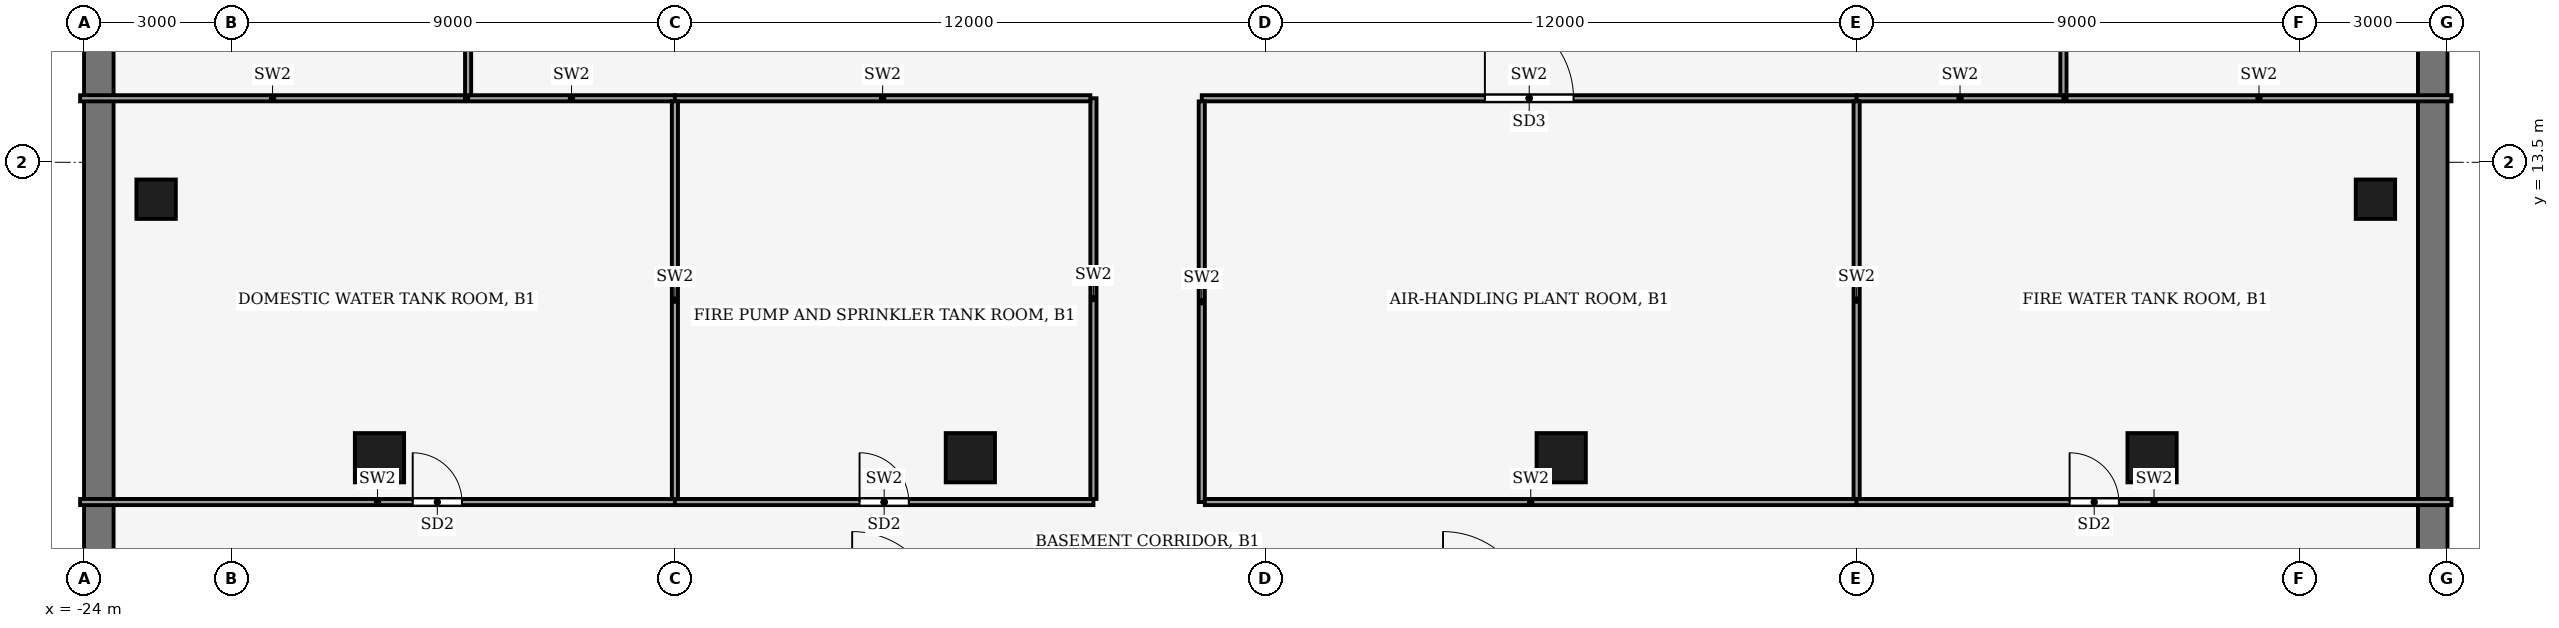
"""IFC4 building model, lengths in metres.
Left out: names, types, materials, properties, quantities, classifications, styles, units other than length and angle.
Written with IfcOpenShell. Run it as: python <this file> out.ifc"""

import sys

from ifc_helpers import new_model, si_unit, direction, frame, frame_2d, origin, origin_2d, place, context, subcontext, project, spatial, rectangle, hollow_rectangle, extrude, element, fill, save


model = new_model("IFC4")
c1 = context("Model", 3, precision=1e-05, world=origin(), true_north=direction((0.0, 1.0)))
c2 = subcontext(c1, "Body", "Model", "MODEL_VIEW")
j1 = project(units=[si_unit("LENGTHUNIT", "METRE"), si_unit("PLANEANGLEUNIT", "RADIAN")], contexts=[c1])
p1 = place(None, origin())
s1 = spatial("IfcSite", under=j1, at=p1, CompositionType="ELEMENT")
p2 = place(p1, origin())
s2 = spatial("IfcBuilding", under=s1, at=p2, CompositionType="ELEMENT")
p3 = place(p2, frame((0.0, 0.0, -6.0)))
s3 = spatial("IfcBuildingStorey", under=s2, at=p3, CompositionType="ELEMENT", Elevation=-6.0)
for number, where, z_axis, x_axis in (
    (1, (-23.7, 0.03, 0.0), (0.0, 0.0, 1.0), (0.0, 1.0, 0.0)),
    (2, (23.7, 38.97, 0.0), (0.0, 0.0, 1.0), (0.0, -1.0, 0.0)),
):
    element("IfcWall", number, at=place(p3, frame(where, z_axis=z_axis, x_axis=x_axis)), inside=s3, PredefinedType="SHEAR", context=c2, shape_type="SweptSolid", body=[
        extrude(rectangle(XDim=38.941, YDim=0.6, at=frame_2d((19.47, 0.0))), origin(), (0.0, 0.0, 1.0), 5.55),
    ])
for number, where, z_axis, x_axis in (
    (3, (22.536, 12.75, 0.0), (0.0, 0.0, 1.0), (1.0, 0.0, 0.0)),
    (4, (-22.536, 12.75, 0.0), (0.0, 0.0, 1.0), (1.0, 0.0, 0.0)),
):
    element("IfcColumn", number, at=place(p3, frame(where, z_axis=z_axis, x_axis=x_axis)), inside=s3, PredefinedType="COLUMN", context=c2, shape_type="SweptSolid", body=[
        extrude(hollow_rectangle(XDim=0.8, YDim=0.8, WallThickness=0.04, at=origin_2d()), origin(), (0.0, 0.0, 1.0), 6.0),
    ])
for number, where, z_axis, x_axis in (
    (5, (-18.0, 7.5, 0.0), (0.0, 0.0, 1.0), (1.0, 0.0, 0.0)),
    (6, (-6.0, 7.5, 0.0), (0.0, 0.0, 1.0), (1.0, 0.0, 0.0)),
    (7, (6.0, 7.5, 0.0), (0.0, 0.0, 1.0), (1.0, 0.0, 0.0)),
    (8, (18.0, 7.5, 0.0), (0.0, 0.0, 1.0), (1.0, 0.0, 0.0)),
):
    element("IfcColumn", number, at=place(p3, frame(where, z_axis=z_axis, x_axis=x_axis)), inside=s3, PredefinedType="COLUMN", context=c2, shape_type="SweptSolid", body=[
        extrude(rectangle(XDim=1.0, YDim=1.0, at=origin_2d()), origin(), (0.0, 0.0, 1.0), 6.0),
    ])
p4 = place(p3, frame((-24.08, 6.6, 0.0), z_axis=(0.0, 0.0, 1.0), x_axis=(1.0, 0.0, 0.0)))
e9 = element("IfcWall", 9, at=p4, inside=s3, PredefinedType="PARTITIONING", context=c2, shape_type="SweptSolid", body=[
    extrude(rectangle(XDim=12.08, YDim=0.125, at=frame_2d((6.04, 0.0))), origin(), (0.0, 0.0, 1.0), 5.55),
])
p5 = place(p4, frame((6.755, 0.0, 0.0)))
e10 = element("IfcOpeningElement", 10, at=p5, cuts=e9, PredefinedType="OPENING", context=c2, shape_type="SweptSolid", body=[
    extrude(rectangle(XDim=1.0, YDim=2.1, at=frame_2d((0.5, 1.05))), frame((0.0, 0.073, 0.0), z_axis=(0.0, -1.0, 0.0), x_axis=(1.0, 0.0, 0.0)), (0.0, 0.0, 1.0), 0.145),
])
p6 = place(p3, frame((-12.0, 14.8, 0.0), z_axis=(0.0, 0.0, 1.0), x_axis=(-1.0, 0.0, 0.0)))
e11 = element("IfcWall", 11, at=p6, inside=s3, PredefinedType="PARTITIONING", context=c2, shape_type="SweptSolid", body=[
    extrude(rectangle(XDim=4.2, YDim=0.125, at=frame_2d((2.1, 0.0))), origin(), (0.0, 0.0, 1.0), 5.55),
])
p7 = place(p3, frame((-12.0, 6.6, 0.0), z_axis=(0.0, 0.0, 1.0), x_axis=(1.0, 0.0, 0.0)))
e12 = element("IfcWall", 12, at=p7, inside=s3, PredefinedType="PARTITIONING", context=c2, shape_type="SweptSolid", body=[
    extrude(rectangle(XDim=8.5, YDim=0.125, at=frame_2d((4.25, 0.0))), origin(), (0.0, 0.0, 1.0), 5.55),
])
p8 = place(p7, frame((3.75, 0.0, 0.0)))
e13 = element("IfcOpeningElement", 13, at=p8, cuts=e12, PredefinedType="OPENING", context=c2, shape_type="SweptSolid", body=[
    extrude(rectangle(XDim=1.0, YDim=2.1, at=frame_2d((0.5, 1.05))), frame((0.0, 0.073, 0.0), z_axis=(0.0, -1.0, 0.0), x_axis=(1.0, 0.0, 0.0)), (0.0, 0.0, 1.0), 0.145),
])
p9 = place(p3, frame((-3.5, 6.663, 0.0), z_axis=(0.0, 0.0, 1.0), x_axis=(0.0, 1.0, 0.0)))
e14 = element("IfcWall", 14, at=p9, inside=s3, PredefinedType="PARTITIONING", context=c2, shape_type="SweptSolid", body=[
    extrude(rectangle(XDim=8.137, YDim=0.125, at=frame_2d((4.069, 0.0))), origin(), (0.0, 0.0, 1.0), 5.55),
])
p10 = place(p3, frame((-3.562, 14.8, 0.0), z_axis=(0.0, 0.0, 1.0), x_axis=(-1.0, 0.0, 0.0)))
e15 = element("IfcWall", 15, at=p10, inside=s3, PredefinedType="PARTITIONING", context=c2, shape_type="SweptSolid", body=[
    extrude(rectangle(XDim=8.438, YDim=0.125, at=frame_2d((4.219, 0.0))), origin(), (0.0, 0.0, 1.0), 5.55),
])
p11 = place(p3, frame((-1.3, 14.8, 0.0), z_axis=(0.0, 0.0, 1.0), x_axis=(1.0, 0.0, 0.0)))
e16 = element("IfcWall", 16, at=p11, inside=s3, PredefinedType="PARTITIONING", context=c2, shape_type="SweptSolid", body=[
    extrude(rectangle(XDim=13.3, YDim=0.125, at=frame_2d((6.65, 0.0))), origin(), (0.0, 0.0, 1.0), 5.55),
])
p12 = place(p11, frame((5.75, 0.0, 0.0)))
e17 = element("IfcOpeningElement", 17, at=p12, cuts=e16, PredefinedType="OPENING", context=c2, shape_type="SweptSolid", body=[
    extrude(rectangle(XDim=1.8, YDim=2.4, at=frame_2d((0.9, 1.2))), frame((0.0, 0.073, 0.0), z_axis=(0.0, -1.0, 0.0), x_axis=(1.0, 0.0, 0.0)), (0.0, 0.0, 1.0), 0.145),
])
p13 = place(p3, frame((-1.3, 14.738, 0.0), z_axis=(0.0, 0.0, 1.0), x_axis=(0.0, -1.0, 0.0)))
e18 = element("IfcWall", 18, at=p13, inside=s3, PredefinedType="PARTITIONING", context=c2, shape_type="SweptSolid", body=[
    extrude(rectangle(XDim=8.137, YDim=0.125, at=frame_2d((4.069, 0.0))), origin(), (0.0, 0.0, 1.0), 5.55),
])
p14 = place(p3, frame((-1.238, 6.6, 0.0), z_axis=(0.0, 0.0, 1.0), x_axis=(1.0, 0.0, 0.0)))
e19 = element("IfcWall", 19, at=p14, inside=s3, PredefinedType="PARTITIONING", context=c2, shape_type="SweptSolid", body=[
    extrude(rectangle(XDim=13.238, YDim=0.125, at=frame_2d((6.619, 0.0))), origin(), (0.0, 0.0, 1.0), 5.55),
])
p15 = place(p3, frame((12.0, 6.6, 0.0), z_axis=(0.0, 0.0, 1.0), x_axis=(1.0, 0.0, 0.0)))
e20 = element("IfcWall", 20, at=p15, inside=s3, PredefinedType="PARTITIONING", context=c2, shape_type="SweptSolid", body=[
    extrude(rectangle(XDim=12.08, YDim=0.125, at=frame_2d((6.04, 0.0))), origin(), (0.0, 0.0, 1.0), 5.55),
])
p16 = place(p15, frame((4.325, 0.0, 0.0)))
e21 = element("IfcOpeningElement", 21, at=p16, cuts=e20, PredefinedType="OPENING", context=c2, shape_type="SweptSolid", body=[
    extrude(rectangle(XDim=1.0, YDim=2.1, at=frame_2d((0.5, 1.05))), frame((0.0, 0.073, 0.0), z_axis=(0.0, -1.0, 0.0), x_axis=(1.0, 0.0, 0.0)), (0.0, 0.0, 1.0), 0.145),
])
p17 = place(p3, frame((16.2, 14.8, 0.0), z_axis=(0.0, 0.0, 1.0), x_axis=(-1.0, 0.0, 0.0)))
e22 = element("IfcWall", 22, at=p17, inside=s3, PredefinedType="PARTITIONING", context=c2, shape_type="SweptSolid", body=[
    extrude(rectangle(XDim=4.2, YDim=0.125, at=frame_2d((2.1, 0.0))), origin(), (0.0, 0.0, 1.0), 5.55),
])
p18 = place(p3, frame((-16.2, 28.0, 0.0), z_axis=(0.0, 0.0, 1.0), x_axis=(0.0, -1.0, 0.0)))
e23 = element("IfcWall", 23, at=p18, inside=s3, PredefinedType="PARTITIONING", context=c2, shape_type="SweptSolid", body=[
    extrude(rectangle(XDim=13.137, YDim=0.125, at=frame_2d((6.569, 0.0))), origin(), (0.0, 0.0, 1.0), 5.55),
])
p19 = place(p18, frame((6.069, 0.0, 0.0)))
e24 = element("IfcOpeningElement", 24, at=p19, cuts=e23, PredefinedType="OPENING", context=c2, shape_type="SweptSolid", body=[
    extrude(rectangle(XDim=1.0, YDim=2.1, at=frame_2d((0.5, 1.05))), frame((0.0, 0.073, 0.0), z_axis=(0.0, -1.0, 0.0), x_axis=(1.0, 0.0, 0.0)), (0.0, 0.0, 1.0), 0.145),
])
p20 = place(p3, frame((16.2, 14.863, 0.0), z_axis=(0.0, 0.0, 1.0), x_axis=(0.0, 1.0, 0.0)))
e25 = element("IfcWall", 25, at=p20, inside=s3, PredefinedType="PARTITIONING", context=c2, shape_type="SweptSolid", body=[
    extrude(rectangle(XDim=13.137, YDim=0.125, at=frame_2d((6.569, 0.0))), origin(), (0.0, 0.0, 1.0), 5.55),
])
p21 = place(p20, frame((6.069, 0.0, 0.0)))
e26 = element("IfcOpeningElement", 26, at=p21, cuts=e25, PredefinedType="OPENING", context=c2, shape_type="SweptSolid", body=[
    extrude(rectangle(XDim=1.0, YDim=2.1, at=frame_2d((0.5, 1.05))), frame((0.0, 0.073, 0.0), z_axis=(0.0, -1.0, 0.0), x_axis=(1.0, 0.0, 0.0)), (0.0, 0.0, 1.0), 0.145),
])
p22 = place(p3, frame((-12.0, 14.738, 0.0), z_axis=(0.0, 0.0, 1.0), x_axis=(0.0, -1.0, 0.0)))
e27 = element("IfcWall", 27, at=p22, inside=s3, PredefinedType="PARTITIONING", context=c2, shape_type="SweptSolid", body=[
    extrude(rectangle(XDim=8.075, YDim=0.125, at=frame_2d((4.038, 0.0))), origin(), (0.0, 0.0, 1.0), 5.55),
])
p23 = place(p3, frame((-24.08, 14.8, 0.0), z_axis=(0.0, 0.0, 1.0), x_axis=(1.0, 0.0, 0.0)))
e28 = element("IfcWall", 28, at=p23, inside=s3, PredefinedType="PARTITIONING", context=c2, shape_type="SweptSolid", body=[
    extrude(rectangle(XDim=7.818, YDim=0.125, at=frame_2d((3.909, 0.0))), origin(), (0.0, 0.0, 1.0), 5.55),
])
p24 = place(p3, frame((12.0, 14.738, 0.0), z_axis=(0.0, 0.0, 1.0), x_axis=(0.0, -1.0, 0.0)))
e29 = element("IfcWall", 29, at=p24, inside=s3, PredefinedType="PARTITIONING", context=c2, shape_type="SweptSolid", body=[
    extrude(rectangle(XDim=8.075, YDim=0.125, at=frame_2d((4.038, 0.0))), origin(), (0.0, 0.0, 1.0), 5.55),
])
p25 = place(p3, frame((16.262, 14.8, 0.0), z_axis=(0.0, 0.0, 1.0), x_axis=(1.0, 0.0, 0.0)))
e30 = element("IfcWall", 30, at=p25, inside=s3, PredefinedType="PARTITIONING", context=c2, shape_type="SweptSolid", body=[
    extrude(rectangle(XDim=7.818, YDim=0.125, at=frame_2d((3.909, 0.0))), origin(), (0.0, 0.0, 1.0), 5.55),
])
p26 = place(p5, origin())
e31 = element("IfcDoor", 31, at=p26, inside=s3, OperationType="SINGLE_SWING_RIGHT", PredefinedType="DOOR", context=c2, shape_type="SweptSolid", body=[
    extrude(rectangle(XDim=1.0, YDim=2.1, at=frame_2d((0.5, 1.05))), frame((0.0, 0.025, 0.0), z_axis=(0.0, -1.0, 0.0), x_axis=(1.0, 0.0, 0.0)), (0.0, 0.0, 1.0), 0.05),
])
fill(e10, e31)
p27 = place(p8, origin())
e32 = element("IfcDoor", 32, at=p27, inside=s3, OperationType="SINGLE_SWING_RIGHT", PredefinedType="DOOR", context=c2, shape_type="SweptSolid", body=[
    extrude(rectangle(XDim=1.0, YDim=2.1, at=frame_2d((0.5, 1.05))), frame((0.0, 0.025, 0.0), z_axis=(0.0, -1.0, 0.0), x_axis=(1.0, 0.0, 0.0)), (0.0, 0.0, 1.0), 0.05),
])
fill(e13, e32)
p28 = place(p12, origin())
e33 = element("IfcDoor", 33, at=p28, inside=s3, OperationType="DOUBLE_DOOR_SINGLE_SWING", PredefinedType="DOOR", context=c2, shape_type="SweptSolid", body=[
    extrude(rectangle(XDim=1.8, YDim=2.4, at=frame_2d((0.9, 1.2))), frame((0.0, 0.025, 0.0), z_axis=(0.0, -1.0, 0.0), x_axis=(1.0, 0.0, 0.0)), (0.0, 0.0, 1.0), 0.05),
])
fill(e17, e33)
p29 = place(p16, origin())
e34 = element("IfcDoor", 34, at=p29, inside=s3, OperationType="SINGLE_SWING_LEFT", PredefinedType="DOOR", context=c2, shape_type="SweptSolid", body=[
    extrude(rectangle(XDim=1.0, YDim=2.1, at=frame_2d((0.5, 1.05))), frame((0.0, 0.025, 0.0), z_axis=(0.0, -1.0, 0.0), x_axis=(1.0, 0.0, 0.0)), (0.0, 0.0, 1.0), 0.05),
])
fill(e21, e34)
save(model, sys.argv[1])
